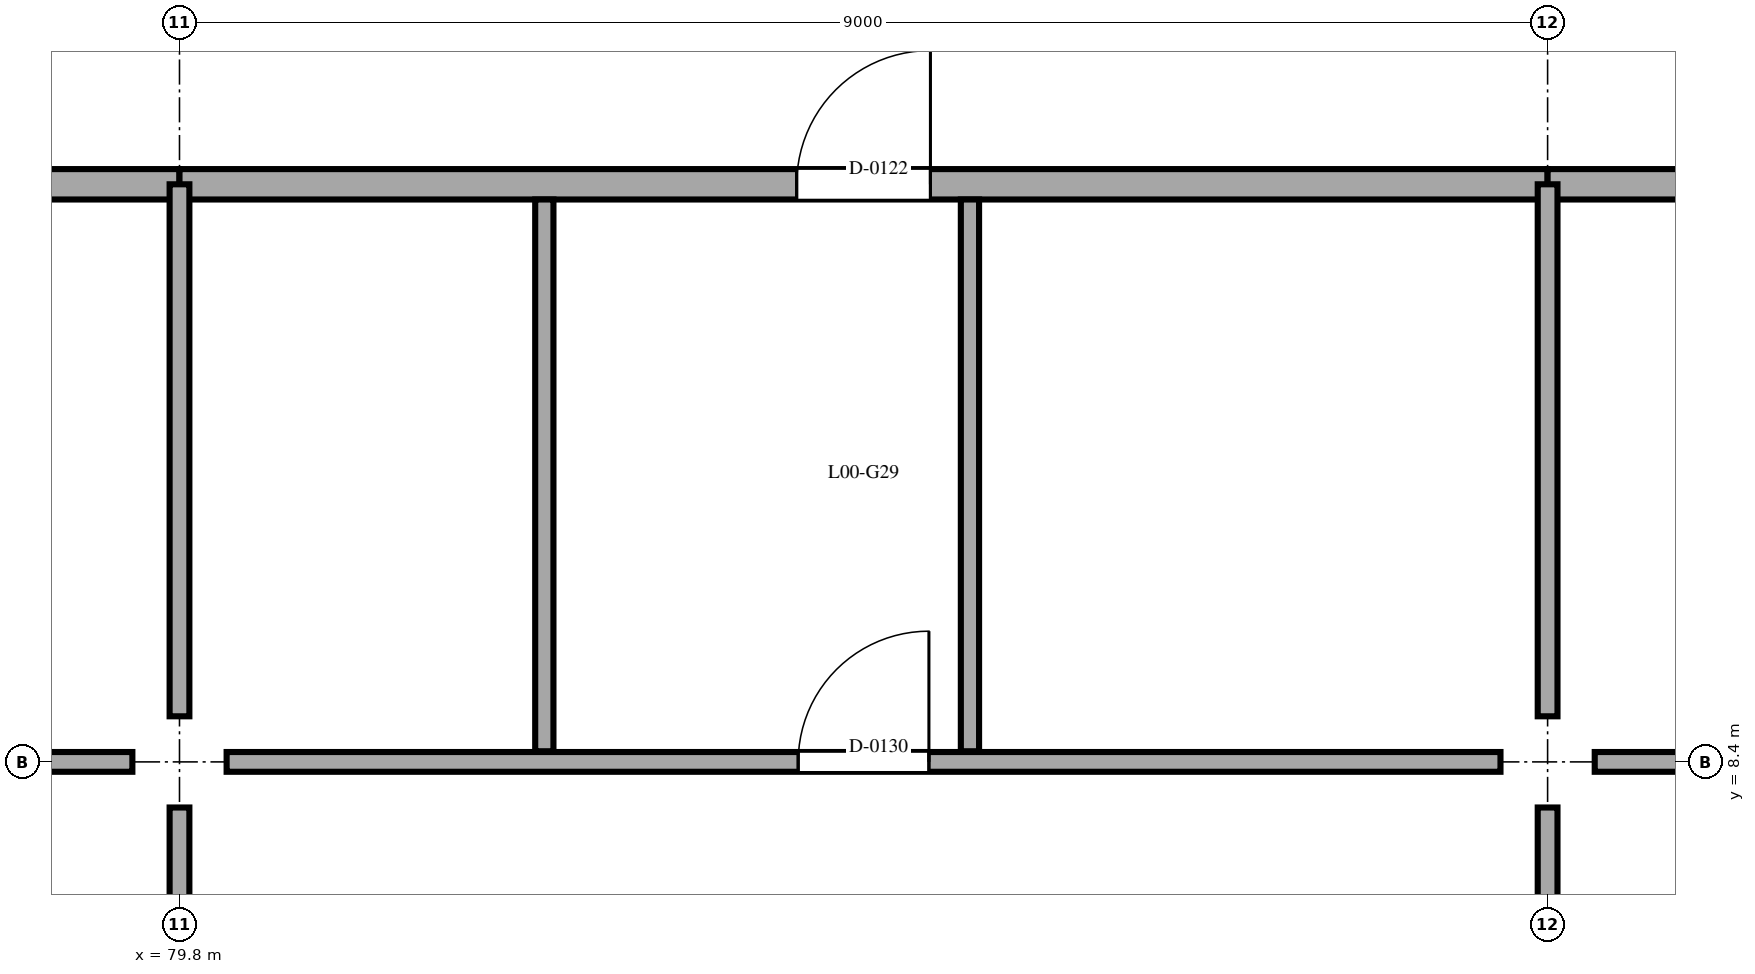
"""IFC4 building model, lengths in metres.
Left out: names, types, materials, properties, quantities, classifications, styles, units other than length and angle.
Written with IfcOpenShell. Run it as: python <this file> out.ifc"""

import sys

from ifc_helpers import new_model, si_unit, direction, frame, frame_2d, origin, origin_2d, place, context, subcontext, project, spatial, rectangle, extrude, element, fill, save


model = new_model("IFC4")
c1 = context("Model", 3, precision=1e-05, world=origin(), true_north=direction((0.0, 1.0)))
c2 = subcontext(c1, "Body", "Model", "MODEL_VIEW")
j1 = project(units=[si_unit("LENGTHUNIT", "METRE"), si_unit("PLANEANGLEUNIT", "RADIAN")], contexts=[c1])
p1 = place(None, origin())
s1 = spatial("IfcSite", under=j1, at=p1, CompositionType="ELEMENT")
p2 = place(p1, origin())
s2 = spatial("IfcBuilding", under=s1, at=p2, CompositionType="ELEMENT")
p3 = place(p2, origin())
s3 = spatial("IfcBuildingStorey", under=s2, at=p3, CompositionType="ELEMENT", Elevation=0.0)
for number, where, z_axis, x_axis in (
    (1, (79.8, 8.4, 0.0), (0.0, 0.0, 1.0), (1.0, 0.0, 0.0)),
    (2, (88.8, 8.4, 0.0), (0.0, 0.0, 1.0), (1.0, 0.0, 0.0)),
):
    element("IfcColumn", number, at=place(p3, frame(where, z_axis=z_axis, x_axis=x_axis)), inside=s3, PredefinedType="COLUMN", context=c2, shape_type="SweptSolid", body=[
        extrude(rectangle(XDim=0.6, YDim=0.6, at=origin_2d()), origin(), (0.0, 0.0, 1.0), 6.0),
    ])
p4 = place(p3, frame((71.4, 12.2, 0.0), z_axis=(0.0, 0.0, 1.0), x_axis=(1.0, 0.0, 0.0)))
e3 = element("IfcWall", 3, at=p4, inside=s3, PredefinedType="STANDARD", context=c2, shape_type="SweptSolid", body=[
    extrude(rectangle(XDim=8.4, YDim=0.2, at=frame_2d((4.2, 0.0))), origin(), (0.0, 0.0, 1.0), 3.05),
])
p5 = place(p4, frame((3.76, 0.0, 0.0)))
e4 = element("IfcOpeningElement", 4, at=p5, cuts=e3, PredefinedType="OPENING", context=c2, shape_type="SweptSolid", body=[
    extrude(rectangle(XDim=0.88, YDim=2.1, at=frame_2d((0.44, 1.05))), frame((0.0, 0.11, 0.0), z_axis=(0.0, -1.0, 0.0), x_axis=(1.0, 0.0, 0.0)), (0.0, 0.0, 1.0), 0.22),
])
p6 = place(p3, frame((79.8, 12.2, 0.0), z_axis=(0.0, 0.0, 1.0), x_axis=(1.0, 0.0, 0.0)))
e5 = element("IfcWall", 5, at=p6, inside=s3, PredefinedType="STANDARD", context=c2, shape_type="SweptSolid", body=[
    extrude(rectangle(XDim=9.0, YDim=0.2, at=frame_2d((4.5, 0.0))), origin(), (0.0, 0.0, 1.0), 3.05),
])
p7 = place(p6, frame((4.06, 0.0, 0.0)))
e6 = element("IfcOpeningElement", 6, at=p7, cuts=e5, PredefinedType="OPENING", context=c2, shape_type="SweptSolid", body=[
    extrude(rectangle(XDim=0.88, YDim=2.1, at=frame_2d((0.44, 1.05))), frame((0.0, 0.11, 0.0), z_axis=(0.0, -1.0, 0.0), x_axis=(1.0, 0.0, 0.0)), (0.0, 0.0, 1.0), 0.22),
])
p8 = place(p3, frame((88.8, 12.2, 0.0), z_axis=(0.0, 0.0, 1.0), x_axis=(1.0, 0.0, 0.0)))
e7 = element("IfcWall", 7, at=p8, inside=s3, PredefinedType="STANDARD", context=c2, shape_type="SweptSolid", body=[
    extrude(rectangle(XDim=8.86, YDim=0.2, at=frame_2d((4.43, 0.0))), origin(), (0.0, 0.0, 1.0), 3.05),
])
p9 = place(p8, frame((3.96, 0.0, 0.0)))
e8 = element("IfcOpeningElement", 8, at=p9, cuts=e7, PredefinedType="OPENING", context=c2, shape_type="SweptSolid", body=[
    extrude(rectangle(XDim=0.88, YDim=2.1, at=frame_2d((0.44, 1.05))), frame((0.0, 0.11, 0.0), z_axis=(0.0, -1.0, 0.0), x_axis=(1.0, 0.0, 0.0)), (0.0, 0.0, 1.0), 0.22),
])
p10 = place(p3, frame((79.8, 0.3, 0.0), z_axis=(0.0, 0.0, 1.0), x_axis=(0.0, 1.0, 0.0)))
e9 = element("IfcWall", 9, at=p10, inside=s3, PredefinedType="STANDARD", context=c2, shape_type="SweptSolid", body=[
    extrude(rectangle(XDim=7.8, YDim=0.13, at=frame_2d((3.9, 0.0))), origin(), (0.0, 0.0, 1.0), 3.05),
])
p11 = place(p3, frame((79.8, 8.7, 0.0), z_axis=(0.0, 0.0, 1.0), x_axis=(0.0, 1.0, 0.0)))
e10 = element("IfcWall", 10, at=p11, inside=s3, PredefinedType="STANDARD", context=c2, shape_type="SweptSolid", body=[
    extrude(rectangle(XDim=3.5, YDim=0.13, at=frame_2d((1.75, 0.0))), origin(), (0.0, 0.0, 1.0), 3.05),
])
p12 = place(p3, frame((88.8, 0.3, 0.0), z_axis=(0.0, 0.0, 1.0), x_axis=(0.0, 1.0, 0.0)))
e11 = element("IfcWall", 11, at=p12, inside=s3, PredefinedType="STANDARD", context=c2, shape_type="SweptSolid", body=[
    extrude(rectangle(XDim=7.8, YDim=0.13, at=frame_2d((3.9, 0.0))), origin(), (0.0, 0.0, 1.0), 3.05),
])
p13 = place(p3, frame((88.8, 8.7, 0.0), z_axis=(0.0, 0.0, 1.0), x_axis=(0.0, 1.0, 0.0)))
e12 = element("IfcWall", 12, at=p13, inside=s3, PredefinedType="STANDARD", context=c2, shape_type="SweptSolid", body=[
    extrude(rectangle(XDim=3.5, YDim=0.13, at=frame_2d((1.75, 0.0))), origin(), (0.0, 0.0, 1.0), 3.05),
])
p14 = place(p3, frame((71.71, 8.4, 0.0), z_axis=(0.0, 0.0, 1.0), x_axis=(1.0, 0.0, 0.0)))
e13 = element("IfcWall", 13, at=p14, inside=s3, PredefinedType="STANDARD", context=c2, shape_type="SweptSolid", body=[
    extrude(rectangle(XDim=7.78, YDim=0.13, at=frame_2d((3.89, 0.0))), origin(), (0.0, 0.0, 1.0), 3.05),
])
p15 = place(p3, frame((80.11, 8.4, 0.0), z_axis=(0.0, 0.0, 1.0), x_axis=(1.0, 0.0, 0.0)))
e14 = element("IfcWall", 14, at=p15, inside=s3, PredefinedType="STANDARD", context=c2, shape_type="SweptSolid", body=[
    extrude(rectangle(XDim=8.38, YDim=0.13, at=frame_2d((4.19, 0.0))), origin(), (0.0, 0.0, 1.0), 3.05),
])
p16 = place(p15, frame((3.76, 0.0, 0.0)))
e15 = element("IfcOpeningElement", 15, at=p16, cuts=e14, PredefinedType="OPENING", context=c2, shape_type="SweptSolid", body=[
    extrude(rectangle(XDim=0.86, YDim=2.1, at=frame_2d((0.43, 1.05))), frame((0.0, 0.075, 0.0), z_axis=(0.0, -1.0, 0.0), x_axis=(1.0, 0.0, 0.0)), (0.0, 0.0, 1.0), 0.15),
])
p17 = place(p3, frame((89.11, 8.4, 0.0), z_axis=(0.0, 0.0, 1.0), x_axis=(1.0, 0.0, 0.0)))
e16 = element("IfcWall", 16, at=p17, inside=s3, PredefinedType="STANDARD", context=c2, shape_type="SweptSolid", body=[
    extrude(rectangle(XDim=8.38, YDim=0.13, at=frame_2d((4.19, 0.0))), origin(), (0.0, 0.0, 1.0), 3.05),
])
for number, where, z_axis, x_axis in (
    (17, (82.2, 8.47, 0.0), (0.0, 0.0, 1.0), (0.0, 1.0, 0.0)),
    (18, (85.0, 8.47, 0.0), (0.0, 0.0, 1.0), (0.0, 1.0, 0.0)),
):
    element("IfcWall", number, at=place(p3, frame(where, z_axis=z_axis, x_axis=x_axis)), inside=s3, PredefinedType="STANDARD", context=c2, shape_type="SweptSolid", body=[
        extrude(rectangle(XDim=3.63, YDim=0.12, at=frame_2d((1.815, 0.0))), origin(), (0.0, 0.0, 1.0), 3.05),
    ])
p18 = place(p7, origin())
e19 = element("IfcDoor", 19, at=p18, inside=s3, OperationType="SINGLE_SWING_RIGHT", PredefinedType="DOOR", context=c2, shape_type="SweptSolid", body=[
    extrude(rectangle(XDim=0.88, YDim=2.1, at=frame_2d((0.44, 1.05))), frame((0.0, 0.025, 0.0), z_axis=(0.0, -1.0, 0.0), x_axis=(1.0, 0.0, 0.0)), (0.0, 0.0, 1.0), 0.05),
])
fill(e6, e19)
p19 = place(p16, origin())
e20 = element("IfcDoor", 20, at=p19, inside=s3, OperationType="SINGLE_SWING_RIGHT", PredefinedType="DOOR", context=c2, shape_type="SweptSolid", body=[
    extrude(rectangle(XDim=0.86, YDim=2.1, at=frame_2d((0.43, 1.05))), frame((0.0, 0.025, 0.0), z_axis=(0.0, -1.0, 0.0), x_axis=(1.0, 0.0, 0.0)), (0.0, 0.0, 1.0), 0.05),
])
fill(e15, e20)
save(model, sys.argv[1])
